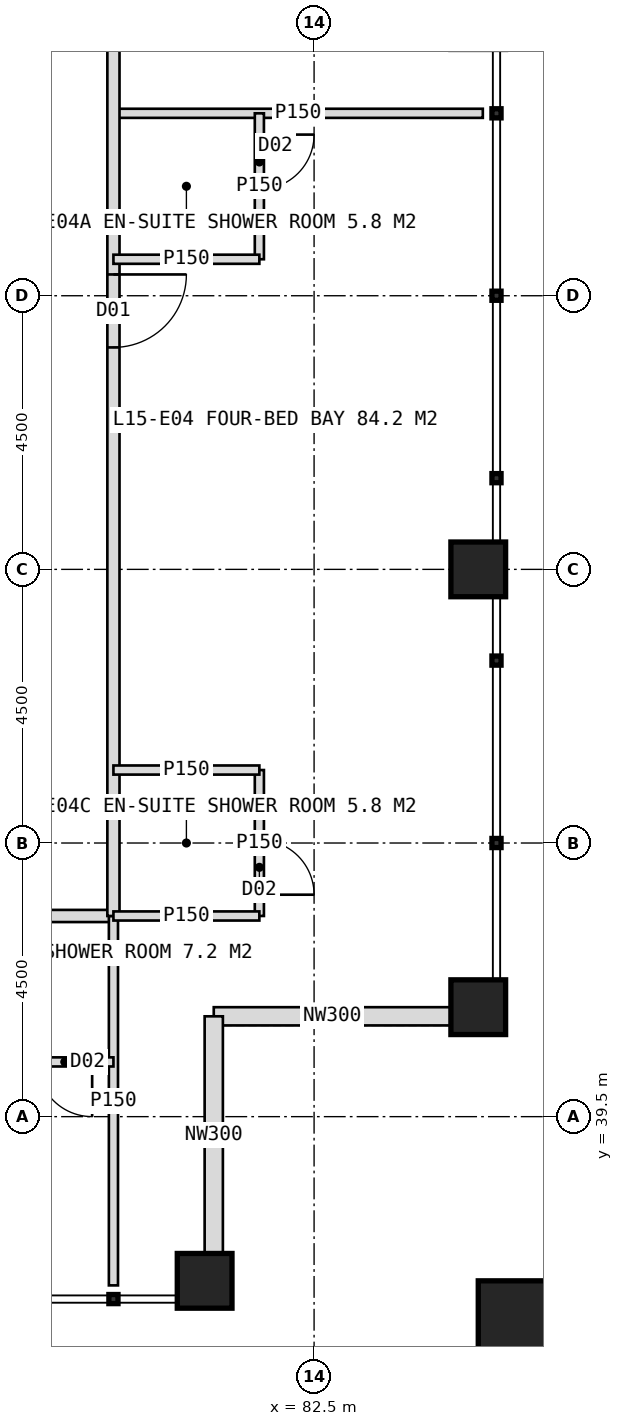
"""IFC4 building model, lengths in metres.
Left out: names, types, materials, properties, quantities, classifications, styles, units other than length and angle.
Written with IfcOpenShell. Run it as: python <this file> out.ifc"""

import sys

from ifc_helpers import new_model, si_unit, direction, frame, frame_2d, origin, origin_2d, place, context, subcontext, project, spatial, rectangle, hollow_rectangle, extrude, element, fill, save


model = new_model("IFC4")
c1 = context("Model", 3, precision=1e-05, world=origin(), true_north=direction((0.0, 1.0)))
c2 = subcontext(c1, "Body", "Model", "MODEL_VIEW")
j1 = project(units=[si_unit("LENGTHUNIT", "METRE"), si_unit("PLANEANGLEUNIT", "RADIAN")], contexts=[c1])
p1 = place(None, origin())
s1 = spatial("IfcSite", under=j1, at=p1, CompositionType="ELEMENT")
p2 = place(p1, origin())
s2 = spatial("IfcBuilding", under=s1, at=p2, CompositionType="ELEMENT")
p3 = place(p2, frame((0.0, 0.0, 67.0)))
s3 = spatial("IfcBuildingStorey", under=s2, at=p3, CompositionType="ELEMENT", Elevation=67.0)
for number, where, z_axis, x_axis in (
    (1, (85.2, 41.3, 0.0), (0.0, 0.0, 1.0), (1.0, 0.0, 0.0)),
    (2, (85.2, 48.5, 0.0), (0.0, 0.0, 1.0), (1.0, 0.0, 0.0)),
    (3, (80.7, 36.8, 0.0), (0.0, 0.0, 1.0), (1.0, 0.0, 0.0)),
):
    element("IfcColumn", number, at=place(p3, frame(where, z_axis=z_axis, x_axis=x_axis)), inside=s3, PredefinedType="COLUMN", context=c2, shape_type="SweptSolid", body=[
        extrude(hollow_rectangle(XDim=0.9, YDim=0.9, WallThickness=0.08, at=origin_2d()), origin(), (0.0, 0.0, 1.0), 4.0),
    ])
p4 = place(p3, frame((86.1, 35.9, 0.0), z_axis=(0.0, 0.0, 1.0), x_axis=(1.0, 0.0, 0.0)))
e4 = element("IfcColumn", 4, at=p4, inside=s3, PredefinedType="COLUMN", context=c2, shape_type="SweptSolid", body=[
    extrude(hollow_rectangle(XDim=1.8, YDim=1.8, WallThickness=0.1, at=origin_2d()), origin(), (0.0, 0.0, 1.0), 4.0),
])
for number, where, z_axis, x_axis in (
    (5, (84.75, 41.15, 0.0), (0.0, 0.0, 1.0), (-1.0, 0.0, 0.0)),
    (6, (80.85, 41.15, 0.0), (0.0, 0.0, 1.0), (0.0, -1.0, 0.0)),
):
    element("IfcWall", number, at=place(p3, frame(where, z_axis=z_axis, x_axis=x_axis)), inside=s3, PredefinedType="ELEMENTEDWALL", context=c2, shape_type="SweptSolid", body=[
        extrude(rectangle(XDim=3.9, YDim=0.3, at=frame_2d((1.95, 0.0))), origin(), (0.0, 0.0, 1.0), 2.95),
    ])
p5 = place(p3, frame((79.2, 42.8, 0.0), z_axis=(0.0, 0.0, 1.0), x_axis=(-1.0, 0.0, 0.0)))
e7 = element("IfcWall", 7, at=p5, inside=s3, PredefinedType="PARTITIONING", context=c2, shape_type="SweptSolid", body=[
    extrude(rectangle(XDim=38.4, YDim=0.2, at=frame_2d((19.2, 0.0))), origin(), (0.0, 0.0, 1.0), 3.75),
])
p6 = place(p5, frame((3.25, 0.0, 0.0)))
e8 = element("IfcOpeningElement", 8, at=p6, cuts=e7, PredefinedType="OPENING", context=c2, shape_type="SweptSolid", body=[
    extrude(rectangle(XDim=1.2, YDim=2.2, at=frame_2d((0.6, 1.1))), frame((0.0, 0.11, 0.0), z_axis=(0.0, -1.0, 0.0), x_axis=(1.0, 0.0, 0.0)), (0.0, 0.0, 1.0), 0.22),
])
p7 = place(p5, frame((13.45, 0.0, 0.0)))
e9 = element("IfcOpeningElement", 9, at=p7, cuts=e7, PredefinedType="OPENING", context=c2, shape_type="SweptSolid", body=[
    extrude(rectangle(XDim=1.2, YDim=2.2, at=frame_2d((0.6, 1.1))), frame((0.0, 0.11, 0.0), z_axis=(0.0, -1.0, 0.0), x_axis=(1.0, 0.0, 0.0)), (0.0, 0.0, 1.0), 0.22),
])
p8 = place(p5, frame((22.45, 0.0, 0.0)))
e10 = element("IfcOpeningElement", 10, at=p8, cuts=e7, PredefinedType="OPENING", context=c2, shape_type="SweptSolid", body=[
    extrude(rectangle(XDim=1.2, YDim=2.2, at=frame_2d((0.6, 1.1))), frame((0.0, 0.11, 0.0), z_axis=(0.0, -1.0, 0.0), x_axis=(1.0, 0.0, 0.0)), (0.0, 0.0, 1.0), 0.22),
])
p9 = place(p5, frame((30.85, 0.0, 0.0)))
e11 = element("IfcOpeningElement", 11, at=p9, cuts=e7, PredefinedType="OPENING", context=c2, shape_type="SweptSolid", body=[
    extrude(rectangle(XDim=1.2, YDim=2.2, at=frame_2d((0.6, 1.1))), frame((0.0, 0.11, 0.0), z_axis=(0.0, -1.0, 0.0), x_axis=(1.0, 0.0, 0.0)), (0.0, 0.0, 1.0), 0.22),
])
p10 = place(p3, frame((79.2, 42.8, 0.0), z_axis=(0.0, 0.0, 1.0), x_axis=(0.0, -1.0, 0.0)))
e12 = element("IfcWall", 12, at=p10, inside=s3, PredefinedType="PARTITIONING", context=c2, shape_type="SweptSolid", body=[
    extrude(rectangle(XDim=6.075, YDim=0.15, at=frame_2d((3.038, 0.0))), origin(), (0.0, 0.0, 1.0), 3.75),
])
p11 = place(p3, frame((79.2, 40.4, 0.0), z_axis=(0.0, 0.0, 1.0), x_axis=(-1.0, 0.0, 0.0)))
e13 = element("IfcWall", 13, at=p11, inside=s3, PredefinedType="PARTITIONING", context=c2, shape_type="SweptSolid", body=[
    extrude(rectangle(XDim=3.0, YDim=0.15, at=frame_2d((1.5, 0.0))), origin(), (0.0, 0.0, 1.0), 3.75),
])
p12 = place(p11, frame((0.35, 0.0, 0.0)))
e14 = element("IfcOpeningElement", 14, at=p12, cuts=e13, PredefinedType="OPENING", context=c2, shape_type="SweptSolid", body=[
    extrude(rectangle(XDim=0.9, YDim=2.1, at=frame_2d((0.45, 1.05))), frame((0.0, 0.085, 0.0), z_axis=(0.0, -1.0, 0.0), x_axis=(1.0, 0.0, 0.0)), (0.0, 0.0, 1.0), 0.17),
])
p13 = place(p3, frame((79.2, 56.0, 0.0), z_axis=(0.0, 0.0, 1.0), x_axis=(1.0, 0.0, 0.0)))
e15 = element("IfcWall", 15, at=p13, inside=s3, PredefinedType="PARTITIONING", context=c2, shape_type="SweptSolid", body=[
    extrude(rectangle(XDim=6.075, YDim=0.15, at=frame_2d((3.038, 0.0))), origin(), (0.0, 0.0, 1.0), 3.75),
])
p14 = place(p3, frame((79.2, 81.2, 0.0), z_axis=(0.0, 0.0, 1.0), x_axis=(0.0, -1.0, 0.0)))
e16 = element("IfcWall", 16, at=p14, inside=s3, PredefinedType="PARTITIONING", context=c2, shape_type="SweptSolid", body=[
    extrude(rectangle(XDim=38.4, YDim=0.2, at=frame_2d((19.2, 0.0))), origin(), (0.0, 0.0, 1.0), 3.75),
])
p15 = place(p14, frame((3.25, 0.0, 0.0)))
e17 = element("IfcOpeningElement", 17, at=p15, cuts=e16, PredefinedType="OPENING", context=c2, shape_type="SweptSolid", body=[
    extrude(rectangle(XDim=1.2, YDim=2.2, at=frame_2d((0.6, 1.1))), frame((0.0, 0.11, 0.0), z_axis=(0.0, -1.0, 0.0), x_axis=(1.0, 0.0, 0.0)), (0.0, 0.0, 1.0), 0.22),
])
p16 = place(p14, frame((13.45, 0.0, 0.0)))
e18 = element("IfcOpeningElement", 18, at=p16, cuts=e16, PredefinedType="OPENING", context=c2, shape_type="SweptSolid", body=[
    extrude(rectangle(XDim=1.2, YDim=2.2, at=frame_2d((0.6, 1.1))), frame((0.0, 0.11, 0.0), z_axis=(0.0, -1.0, 0.0), x_axis=(1.0, 0.0, 0.0)), (0.0, 0.0, 1.0), 0.22),
])
p17 = place(p14, frame((21.85, 0.0, 0.0)))
e19 = element("IfcOpeningElement", 19, at=p17, cuts=e16, PredefinedType="OPENING", context=c2, shape_type="SweptSolid", body=[
    extrude(rectangle(XDim=1.2, YDim=2.2, at=frame_2d((0.6, 1.1))), frame((0.0, 0.11, 0.0), z_axis=(0.0, -1.0, 0.0), x_axis=(1.0, 0.0, 0.0)), (0.0, 0.0, 1.0), 0.22),
])
p18 = place(p14, frame((27.85, 0.0, 0.0)))
e20 = element("IfcOpeningElement", 20, at=p18, cuts=e16, PredefinedType="OPENING", context=c2, shape_type="SweptSolid", body=[
    extrude(rectangle(XDim=1.2, YDim=2.2, at=frame_2d((0.6, 1.1))), frame((0.0, 0.11, 0.0), z_axis=(0.0, -1.0, 0.0), x_axis=(1.0, 0.0, 0.0)), (0.0, 0.0, 1.0), 0.22),
])
p19 = place(p3, frame((81.6, 56.0, 0.0), z_axis=(0.0, 0.0, 1.0), x_axis=(0.0, -1.0, 0.0)))
e21 = element("IfcWall", 21, at=p19, inside=s3, PredefinedType="PARTITIONING", context=c2, shape_type="SweptSolid", body=[
    extrude(rectangle(XDim=2.4, YDim=0.15, at=frame_2d((1.2, 0.0))), origin(), (0.0, 0.0, 1.0), 3.75),
])
p20 = place(p19, frame((0.35, 0.0, 0.0)))
e22 = element("IfcOpeningElement", 22, at=p20, cuts=e21, PredefinedType="OPENING", context=c2, shape_type="SweptSolid", body=[
    extrude(rectangle(XDim=0.9, YDim=2.1, at=frame_2d((0.45, 1.05))), frame((0.0, 0.085, 0.0), z_axis=(0.0, -1.0, 0.0), x_axis=(1.0, 0.0, 0.0)), (0.0, 0.0, 1.0), 0.17),
])
p21 = place(p3, frame((79.2, 53.6, 0.0), z_axis=(0.0, 0.0, 1.0), x_axis=(1.0, 0.0, 0.0)))
e23 = element("IfcWall", 23, at=p21, inside=s3, PredefinedType="PARTITIONING", context=c2, shape_type="SweptSolid", body=[
    extrude(rectangle(XDim=2.4, YDim=0.15, at=frame_2d((1.2, 0.0))), origin(), (0.0, 0.0, 1.0), 3.75),
])
p22 = place(p3, frame((81.6, 45.2, 0.0), z_axis=(0.0, 0.0, 1.0), x_axis=(0.0, -1.0, 0.0)))
e24 = element("IfcWall", 24, at=p22, inside=s3, PredefinedType="PARTITIONING", context=c2, shape_type="SweptSolid", body=[
    extrude(rectangle(XDim=2.4, YDim=0.15, at=frame_2d((1.2, 0.0))), origin(), (0.0, 0.0, 1.0), 3.75),
])
p23 = place(p22, frame((1.15, 0.0, 0.0)))
e25 = element("IfcOpeningElement", 25, at=p23, cuts=e24, PredefinedType="OPENING", context=c2, shape_type="SweptSolid", body=[
    extrude(rectangle(XDim=0.9, YDim=2.1, at=frame_2d((0.45, 1.05))), frame((0.0, 0.085, 0.0), z_axis=(0.0, -1.0, 0.0), x_axis=(1.0, 0.0, 0.0)), (0.0, 0.0, 1.0), 0.17),
])
for number, where, z_axis, x_axis in (
    (26, (79.2, 45.2, 0.0), (0.0, 0.0, 1.0), (1.0, 0.0, 0.0)),
    (27, (79.2, 42.8, 0.0), (0.0, 0.0, 1.0), (1.0, 0.0, 0.0)),
):
    element("IfcWall", number, at=place(p3, frame(where, z_axis=z_axis, x_axis=x_axis)), inside=s3, PredefinedType="PARTITIONING", context=c2, shape_type="SweptSolid", body=[
        extrude(rectangle(XDim=2.4, YDim=0.15, at=frame_2d((1.2, 0.0))), origin(), (0.0, 0.0, 1.0), 3.75),
    ])
p24 = place(p12, origin())
e28 = element("IfcDoor", 28, at=p24, inside=s3, OperationType="SINGLE_SWING_LEFT", PredefinedType="DOOR", context=c2, shape_type="SweptSolid", body=[
    extrude(rectangle(XDim=0.9, YDim=2.1, at=frame_2d((0.45, 1.05))), frame((0.0, 0.025, 0.0), z_axis=(0.0, -1.0, 0.0), x_axis=(1.0, 0.0, 0.0)), (0.0, 0.0, 1.0), 0.05),
])
fill(e14, e28)
p25 = place(p18, origin())
e29 = element("IfcDoor", 29, at=p25, inside=s3, OperationType="SINGLE_SWING_LEFT", PredefinedType="DOOR", context=c2, shape_type="SweptSolid", body=[
    extrude(rectangle(XDim=1.2, YDim=2.2, at=frame_2d((0.6, 1.1))), frame((0.0, 0.025, 0.0), z_axis=(0.0, -1.0, 0.0), x_axis=(1.0, 0.0, 0.0)), (0.0, 0.0, 1.0), 0.05),
])
fill(e20, e29)
p26 = place(p20, origin())
e30 = element("IfcDoor", 30, at=p26, inside=s3, OperationType="SINGLE_SWING_LEFT", PredefinedType="DOOR", context=c2, shape_type="SweptSolid", body=[
    extrude(rectangle(XDim=0.9, YDim=2.1, at=frame_2d((0.45, 1.05))), frame((0.0, 0.025, 0.0), z_axis=(0.0, -1.0, 0.0), x_axis=(1.0, 0.0, 0.0)), (0.0, 0.0, 1.0), 0.05),
])
fill(e22, e30)
p27 = place(p23, origin())
e31 = element("IfcDoor", 31, at=p27, inside=s3, OperationType="SINGLE_SWING_RIGHT", PredefinedType="DOOR", context=c2, shape_type="SweptSolid", body=[
    extrude(rectangle(XDim=0.9, YDim=2.1, at=frame_2d((0.45, 1.05))), frame((0.0, 0.025, 0.0), z_axis=(0.0, -1.0, 0.0), x_axis=(1.0, 0.0, 0.0)), (0.0, 0.0, 1.0), 0.05),
])
fill(e25, e31)
save(model, sys.argv[1])
